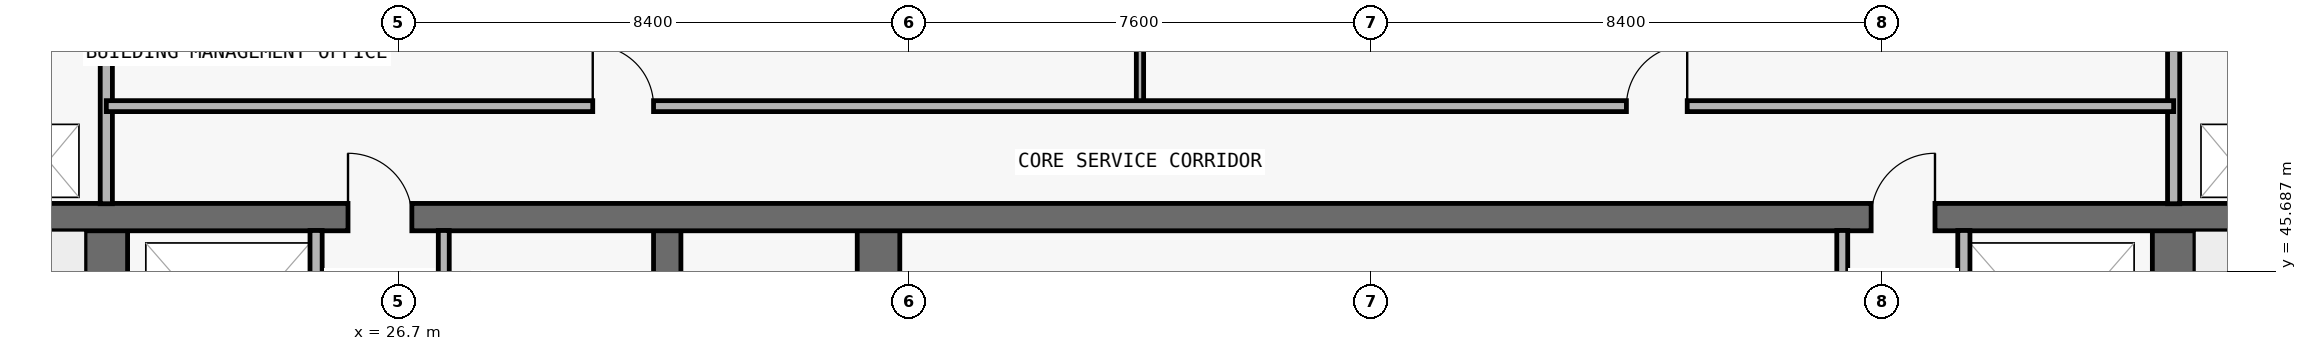
"""IFC4 building model, lengths in metres.
Left out: names, types, materials, properties, quantities, classifications, styles, units other than length and angle.
Written with IfcOpenShell. Run it as: python <this file> out.ifc"""

import sys

from ifc_helpers import new_model, si_unit, direction, frame, frame_2d, origin, place, context, subcontext, project, spatial, rectangle, extrude, element, fill, save


model = new_model("IFC4")
c1 = context("Model", 3, precision=1e-05, world=origin(), true_north=direction((0.0, 1.0)))
c2 = subcontext(c1, "Body", "Model", "MODEL_VIEW")
j1 = project(units=[si_unit("LENGTHUNIT", "METRE"), si_unit("PLANEANGLEUNIT", "RADIAN")], contexts=[c1])
p1 = place(None, origin())
s1 = spatial("IfcSite", under=j1, at=p1, CompositionType="ELEMENT")
p2 = place(p1, origin())
s2 = spatial("IfcBuilding", under=s1, at=p2, CompositionType="ELEMENT")
p3 = place(p2, frame((0.0, 0.0, 284.8)))
s3 = spatial("IfcBuildingStorey", under=s2, at=p3, CompositionType="ELEMENT", Elevation=284.8)
p4 = place(p3, frame((21.9, 37.0, 0.0), z_axis=(0.0, 0.0, 1.0), x_axis=(0.0, 1.0, 0.0)))
e1 = element("IfcWall", 1, at=p4, inside=s3, PredefinedType="SHEAR", context=c2, shape_type="SweptSolid", body=[
    extrude(rectangle(XDim=9.575, YDim=0.7, at=frame_2d((4.788, 0.0))), origin(), (0.0, 0.0, 1.0), 5.1),
])
p5 = place(p4, frame((0.55, 0.0, 0.0)))
e2 = element("IfcOpeningElement", 2, at=p5, cuts=e1, PredefinedType="OPENING", context=c2, shape_type="SweptSolid", body=[
    extrude(rectangle(XDim=1.1, YDim=2.15, at=frame_2d((0.55, 1.075))), frame((0.0, 0.36, 0.0), z_axis=(0.0, -1.0, 0.0), x_axis=(1.0, 0.0, 0.0)), (0.0, 0.0, 1.0), 0.72),
])
p6 = place(p3, frame((55.9, 37.0, 0.0), z_axis=(0.0, 0.0, 1.0), x_axis=(0.0, 1.0, 0.0)))
e3 = element("IfcWall", 3, at=p6, inside=s3, PredefinedType="SHEAR", context=c2, shape_type="SweptSolid", body=[
    extrude(rectangle(XDim=9.575, YDim=0.7, at=frame_2d((4.788, 0.0))), origin(), (0.0, 0.0, 1.0), 5.1),
])
p7 = place(p6, frame((0.55, 0.0, 0.0)))
e4 = element("IfcOpeningElement", 4, at=p7, cuts=e3, PredefinedType="OPENING", context=c2, shape_type="SweptSolid", body=[
    extrude(rectangle(XDim=1.1, YDim=2.15, at=frame_2d((0.55, 1.075))), frame((0.0, 0.36, 0.0), z_axis=(0.0, -1.0, 0.0), x_axis=(1.0, 0.0, 0.0)), (0.0, 0.0, 1.0), 0.72),
])
p8 = place(p3, frame((31.125, 37.0, 0.0), z_axis=(0.0, 0.0, 1.0), x_axis=(0.0, 1.0, 0.0)))
e5 = element("IfcWall", 5, at=p8, inside=s3, PredefinedType="SHEAR", context=c2, shape_type="SweptSolid", body=[
    extrude(rectangle(XDim=9.575, YDim=0.45, at=frame_2d((4.788, 0.0))), origin(), (0.0, 0.0, 1.0), 5.1),
])
p9 = place(p3, frame((34.6, 37.0, 0.0), z_axis=(0.0, 0.0, 1.0), x_axis=(0.0, 1.0, 0.0)))
e6 = element("IfcWall", 6, at=p9, inside=s3, PredefinedType="SHEAR", context=c2, shape_type="SweptSolid", body=[
    extrude(rectangle(XDim=9.575, YDim=0.7, at=frame_2d((4.788, 0.0))), origin(), (0.0, 0.0, 1.0), 5.1),
])
p10 = place(p3, frame((18.3, 46.575, 0.0), z_axis=(0.0, 0.0, 1.0), x_axis=(1.0, 0.0, 0.0)))
e7 = element("IfcWall", 7, at=p10, inside=s3, PredefinedType="SHEAR", context=c2, shape_type="SweptSolid", body=[
    extrude(rectangle(XDim=41.2, YDim=0.45, at=frame_2d((20.6, 0.0))), origin(), (0.0, 0.0, 1.0), 5.1),
])
p11 = place(p10, frame((7.575, 0.0, 0.0)))
e8 = element("IfcOpeningElement", 8, at=p11, cuts=e7, PredefinedType="OPENING", context=c2, shape_type="SweptSolid", body=[
    extrude(rectangle(XDim=1.05, YDim=2.15, at=frame_2d((0.525, 1.075))), frame((0.0, 0.235, 0.0), z_axis=(0.0, -1.0, 0.0), x_axis=(1.0, 0.0, 0.0)), (0.0, 0.0, 1.0), 0.47),
])
p12 = place(p10, frame((32.625, 0.0, 0.0)))
e9 = element("IfcOpeningElement", 9, at=p12, cuts=e7, PredefinedType="OPENING", context=c2, shape_type="SweptSolid", body=[
    extrude(rectangle(XDim=1.05, YDim=2.15, at=frame_2d((0.525, 1.075))), frame((0.0, 0.235, 0.0), z_axis=(0.0, -1.0, 0.0), x_axis=(1.0, 0.0, 0.0)), (0.0, 0.0, 1.0), 0.47),
])
p13 = place(p3, frame((21.9, 46.795, 0.0), z_axis=(0.0, 0.0, 1.0), x_axis=(0.0, 1.0, 0.0)))
e10 = element("IfcWall", 10, at=p13, inside=s3, PredefinedType="PARTITIONING", context=c2, shape_type="SweptSolid", body=[
    extrude(rectangle(XDim=3.16, YDim=0.2, at=frame_2d((1.58, 0.0))), origin(), (0.0, 0.0, 1.0), 5.1),
])
p14 = place(p3, frame((25.35, 43.17, 0.0), z_axis=(0.0, 0.0, 1.0), x_axis=(0.0, 1.0, 0.0)))
e11 = element("IfcWall", 11, at=p14, inside=s3, PredefinedType="PARTITIONING", context=c2, shape_type="SweptSolid", body=[
    extrude(rectangle(XDim=3.185, YDim=0.2, at=frame_2d((1.593, 0.0))), origin(), (0.0, 0.0, 1.0), 5.1),
])
p15 = place(p3, frame((27.45, 43.17, 0.0), z_axis=(0.0, 0.0, 1.0), x_axis=(0.0, 1.0, 0.0)))
e12 = element("IfcWall", 12, at=p15, inside=s3, PredefinedType="PARTITIONING", context=c2, shape_type="SweptSolid", body=[
    extrude(rectangle(XDim=3.185, YDim=0.18, at=frame_2d((1.593, 0.0))), origin(), (0.0, 0.0, 1.0), 5.1),
])
p16 = place(p3, frame((38.9, 48.4, 0.0), z_axis=(0.0, 0.0, 1.0), x_axis=(0.0, 1.0, 0.0)))
e13 = element("IfcWall", 13, at=p16, inside=s3, PredefinedType="PARTITIONING", context=c2, shape_type="SweptSolid", body=[
    extrude(rectangle(XDim=1.555, YDim=0.12, at=frame_2d((0.778, 0.0))), origin(), (0.0, 0.0, 1.0), 5.1),
])
p17 = place(p3, frame((50.45, 43.17, 0.0), z_axis=(0.0, 0.0, 1.0), x_axis=(0.0, 1.0, 0.0)))
e14 = element("IfcWall", 14, at=p17, inside=s3, PredefinedType="PARTITIONING", context=c2, shape_type="SweptSolid", body=[
    extrude(rectangle(XDim=3.185, YDim=0.18, at=frame_2d((1.593, 0.0))), origin(), (0.0, 0.0, 1.0), 5.1),
])
p18 = place(p3, frame((52.45, 43.17, 0.0), z_axis=(0.0, 0.0, 1.0), x_axis=(0.0, 1.0, 0.0)))
e15 = element("IfcWall", 15, at=p18, inside=s3, PredefinedType="PARTITIONING", context=c2, shape_type="SweptSolid", body=[
    extrude(rectangle(XDim=3.185, YDim=0.2, at=frame_2d((1.593, 0.0))), origin(), (0.0, 0.0, 1.0), 5.1),
])
p19 = place(p3, frame((55.9, 46.795, 0.0), z_axis=(0.0, 0.0, 1.0), x_axis=(0.0, 1.0, 0.0)))
e16 = element("IfcWall", 16, at=p19, inside=s3, PredefinedType="PARTITIONING", context=c2, shape_type="SweptSolid", body=[
    extrude(rectangle(XDim=3.16, YDim=0.2, at=frame_2d((1.58, 0.0))), origin(), (0.0, 0.0, 1.0), 5.1),
])
p20 = place(p3, frame((21.9, 48.4, 0.0), z_axis=(0.0, 0.0, 1.0), x_axis=(1.0, 0.0, 0.0)))
e17 = element("IfcWall", 17, at=p20, inside=s3, PredefinedType="PARTITIONING", context=c2, shape_type="SweptSolid", body=[
    extrude(rectangle(XDim=34.0, YDim=0.18, at=frame_2d((17.0, 0.0))), origin(), (0.0, 0.0, 1.0), 5.1),
])
p21 = place(p20, frame((8.0, 0.0, 0.0)))
e18 = element("IfcOpeningElement", 18, at=p21, cuts=e17, PredefinedType="OPENING", context=c2, shape_type="SweptSolid", body=[
    extrude(rectangle(XDim=1.0, YDim=2.2, at=frame_2d((0.5, 1.1))), frame((0.0, 0.1, 0.0), z_axis=(0.0, -1.0, 0.0), x_axis=(1.0, 0.0, 0.0)), (0.0, 0.0, 1.0), 0.2),
])
p22 = place(p20, frame((25.0, 0.0, 0.0)))
e19 = element("IfcOpeningElement", 19, at=p22, cuts=e17, PredefinedType="OPENING", context=c2, shape_type="SweptSolid", body=[
    extrude(rectangle(XDim=1.0, YDim=2.2, at=frame_2d((0.5, 1.1))), frame((0.0, 0.1, 0.0), z_axis=(0.0, -1.0, 0.0), x_axis=(1.0, 0.0, 0.0)), (0.0, 0.0, 1.0), 0.2),
])
p23 = place(p11, origin())
e20 = element("IfcDoor", 20, at=p23, inside=s3, OperationType="SINGLE_SWING_LEFT", PredefinedType="DOOR", context=c2, shape_type="SweptSolid", body=[
    extrude(rectangle(XDim=1.05, YDim=2.15, at=frame_2d((0.525, 1.075))), frame((0.0, 0.025, 0.0), z_axis=(0.0, -1.0, 0.0), x_axis=(1.0, 0.0, 0.0)), (0.0, 0.0, 1.0), 0.05),
])
fill(e8, e20)
p24 = place(p12, origin())
e21 = element("IfcDoor", 21, at=p24, inside=s3, OperationType="SINGLE_SWING_RIGHT", PredefinedType="DOOR", context=c2, shape_type="SweptSolid", body=[
    extrude(rectangle(XDim=1.05, YDim=2.15, at=frame_2d((0.525, 1.075))), frame((0.0, 0.025, 0.0), z_axis=(0.0, -1.0, 0.0), x_axis=(1.0, 0.0, 0.0)), (0.0, 0.0, 1.0), 0.05),
])
fill(e9, e21)
p25 = place(p21, origin())
e22 = element("IfcDoor", 22, at=p25, inside=s3, OperationType="SINGLE_SWING_LEFT", PredefinedType="DOOR", context=c2, shape_type="SweptSolid", body=[
    extrude(rectangle(XDim=1.0, YDim=2.2, at=frame_2d((0.5, 1.1))), frame((0.0, 0.025, 0.0), z_axis=(0.0, -1.0, 0.0), x_axis=(1.0, 0.0, 0.0)), (0.0, 0.0, 1.0), 0.05),
])
fill(e18, e22)
p26 = place(p22, origin())
e23 = element("IfcDoor", 23, at=p26, inside=s3, OperationType="SINGLE_SWING_RIGHT", PredefinedType="DOOR", context=c2, shape_type="SweptSolid", body=[
    extrude(rectangle(XDim=1.0, YDim=2.2, at=frame_2d((0.5, 1.1))), frame((0.0, 0.025, 0.0), z_axis=(0.0, -1.0, 0.0), x_axis=(1.0, 0.0, 0.0)), (0.0, 0.0, 1.0), 0.05),
])
fill(e19, e23)
save(model, sys.argv[1])
